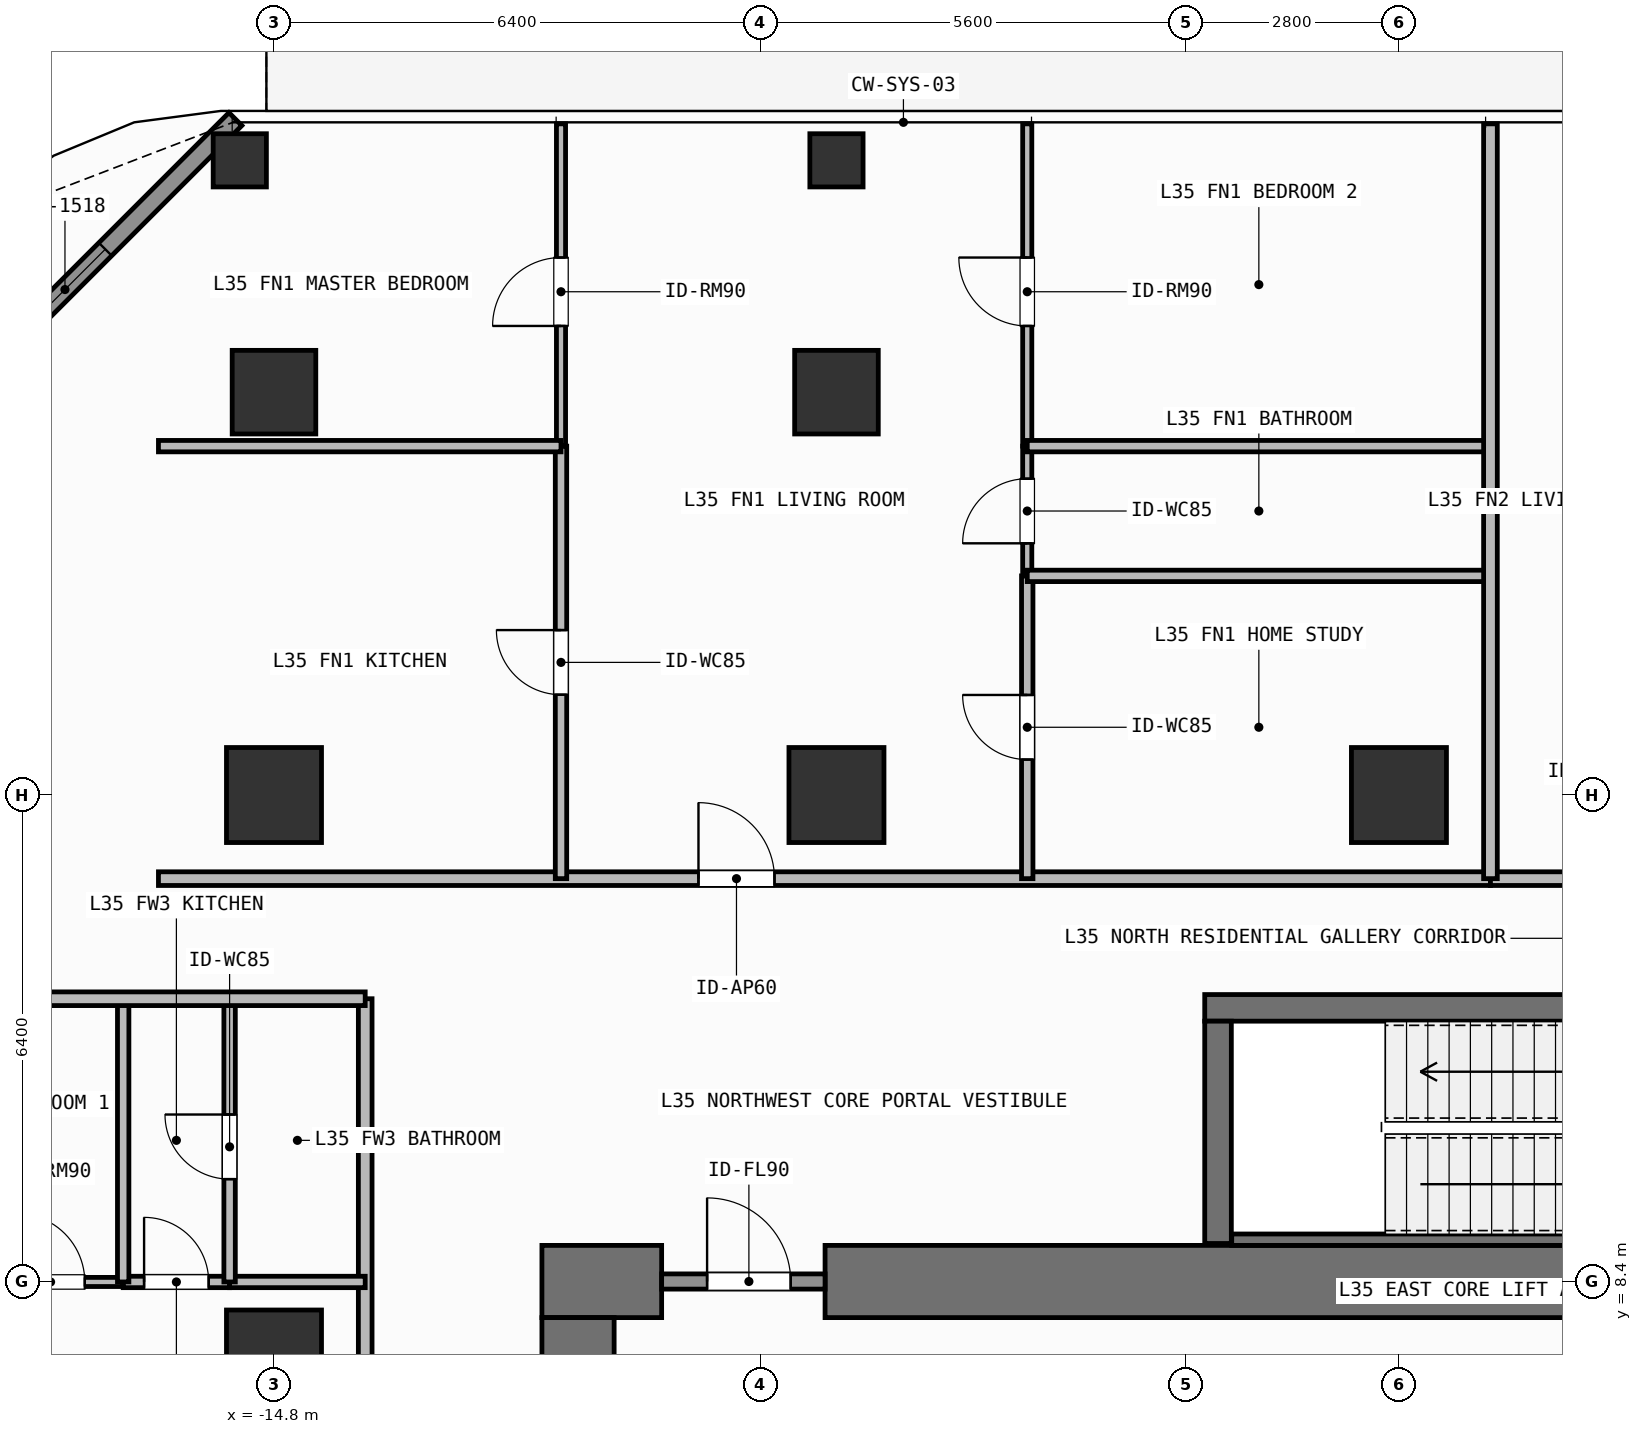
"""IFC4 building model, lengths in metres.
Left out: names, types, materials, properties, quantities, classifications, styles, units other than length and angle.
Written with IfcOpenShell. Run it as: python <this file> out.ifc"""

import sys

from ifc_helpers import new_model, si_unit, direction, frame, frame_2d, origin, origin_2d, place, context, subcontext, project, spatial, rectangle, hollow_rectangle, extrude, element, fill, save


model = new_model("IFC4")
c1 = context("Model", 3, precision=1e-05, world=origin(), true_north=direction((0.0, 1.0)))
c2 = subcontext(c1, "Body", "Model", "MODEL_VIEW")
j1 = project(units=[si_unit("LENGTHUNIT", "METRE"), si_unit("PLANEANGLEUNIT", "RADIAN")], contexts=[c1])
p1 = place(None, origin())
s1 = spatial("IfcSite", under=j1, at=p1, CompositionType="ELEMENT")
p2 = place(p1, origin())
s2 = spatial("IfcBuilding", under=s1, at=p2, CompositionType="ELEMENT")
p3 = place(p2, frame((0.0, 0.0, 140.7)))
s3 = spatial("IfcBuildingStorey", under=s2, at=p3, CompositionType="ELEMENT", Elevation=140.7)
p4 = place(p3, frame((-11.275, 8.4, 0.0), z_axis=(0.0, 0.0, 1.0), x_axis=(1.0, 0.0, 0.0)))
e1 = element("IfcWall", 1, at=p4, inside=s3, PredefinedType="SHEAR", context=c2, shape_type="SweptSolid", body=[
    extrude(rectangle(XDim=1.575, YDim=0.95, at=frame_2d((0.788, 0.0))), origin(), (0.0, 0.0, 1.0), 3.9),
])
p5 = place(p3, frame((-7.55, 8.4, 0.0), z_axis=(0.0, 0.0, 1.0), x_axis=(1.0, 0.0, 0.0)))
e2 = element("IfcWall", 2, at=p5, inside=s3, PredefinedType="SHEAR", context=c2, shape_type="SweptSolid", body=[
    extrude(rectangle(XDim=16.425, YDim=0.95, at=frame_2d((8.212, 0.0))), origin(), (0.0, 0.0, 1.0), 3.9),
])
p6 = place(p3, frame((-10.8, -7.925, 0.0), z_axis=(0.0, 0.0, 1.0), x_axis=(0.0, 1.0, 0.0)))
e3 = element("IfcWall", 3, at=p6, inside=s3, PredefinedType="SHEAR", context=c2, shape_type="SweptSolid", body=[
    extrude(rectangle(XDim=15.85, YDim=0.95, at=frame_2d((7.925, 0.0))), origin(), (0.0, 0.0, 1.0), 3.9),
])
p7 = place(p3, frame((-2.555, 12.0, 0.0), z_axis=(0.0, 0.0, 1.0), x_axis=(1.0, 0.0, 0.0)))
e4 = element("IfcWall", 4, at=p7, inside=s3, PredefinedType="SHEAR", context=c2, shape_type="SweptSolid", body=[
    extrude(rectangle(XDim=7.31, YDim=0.35, at=frame_2d((3.655, 0.0))), origin(), (0.0, 0.0, 1.0), 3.9),
])
p8 = place(p3, frame((-2.2, 8.95, 0.0), z_axis=(0.0, 0.0, 1.0), x_axis=(1.0, 0.0, 0.0)))
e5 = element("IfcWall", 5, at=p8, inside=s3, PredefinedType="SHEAR", context=c2, shape_type="SweptSolid", body=[
    extrude(rectangle(XDim=6.6, YDim=0.15, at=frame_2d((3.3, 0.0))), origin(), (0.0, 0.0, 1.0), 3.9),
])
p9 = place(p3, frame((-2.38, 8.9, 0.0), z_axis=(0.0, 0.0, 1.0), x_axis=(0.0, 1.0, 0.0)))
e6 = element("IfcWall", 6, at=p9, inside=s3, PredefinedType="SHEAR", context=c2, shape_type="SweptSolid", body=[
    extrude(rectangle(XDim=2.925, YDim=0.35, at=frame_2d((1.462, 0.0))), origin(), (0.0, 0.0, 1.0), 3.9),
])
for number, where, z_axis, x_axis in (
    (7, (-14.8, 14.8, 0.0), (0.0, 0.0, 1.0), (1.0, 0.0, 0.0)),
    (8, (-7.4, 14.8, 0.0), (0.0, 0.0, 1.0), (1.0, 0.0, 0.0)),
    (9, (0.0, 14.8, 0.0), (0.0, 0.0, 1.0), (1.0, 0.0, 0.0)),
    (10, (-14.8, 7.4, 0.0), (0.0, 0.0, 1.0), (1.0, 0.0, 0.0)),
):
    element("IfcColumn", number, at=place(p3, frame(where, z_axis=z_axis, x_axis=x_axis)), inside=s3, PredefinedType="COLUMN", context=c2, shape_type="SweptSolid", body=[
        extrude(rectangle(XDim=1.25, YDim=1.25, at=origin_2d()), origin(), (0.0, 0.0, 1.0), 3.9),
    ])
for number, where, z_axis, x_axis in (
    (11, (-14.8, 20.1, 0.0), (0.0, 0.0, 1.0), (1.0, 0.0, 0.0)),
    (12, (-7.4, 20.1, 0.0), (0.0, 0.0, 1.0), (1.0, 0.0, 0.0)),
):
    element("IfcColumn", number, at=place(p3, frame(where, z_axis=z_axis, x_axis=x_axis)), inside=s3, PredefinedType="COLUMN", context=c2, shape_type="SweptSolid", body=[
        extrude(rectangle(XDim=1.1, YDim=1.1, at=origin_2d()), origin(), (0.0, 0.0, 1.0), 3.9),
    ])
for number, where, z_axis, x_axis in (
    (13, (-15.25, 23.15, 0.0), (0.0, 0.0, 1.0), (1.0, 0.0, 0.0)),
    (14, (-7.4, 23.15, 0.0), (0.0, 0.0, 1.0), (1.0, 0.0, 0.0)),
):
    element("IfcColumn", number, at=place(p3, frame(where, z_axis=z_axis, x_axis=x_axis)), inside=s3, PredefinedType="COLUMN", context=c2, shape_type="SweptSolid", body=[
        extrude(hollow_rectangle(XDim=0.7, YDim=0.7, WallThickness=0.032, at=origin_2d()), origin(), (0.0, 0.0, 1.0), 3.9),
    ])
p10 = place(p3, frame((-19.792, 19.208, 0.0), z_axis=(0.0, 0.0, 1.0), x_axis=(0.707106781187, 0.707106781187, 0.0)))
e15 = element("IfcWall", 15, at=p10, inside=s3, PredefinedType="SOLIDWALL", context=c2, shape_type="SweptSolid", body=[
    extrude(rectangle(XDim=6.343, YDim=0.24, at=frame_2d((3.171, 0.0))), origin(), (0.0, 0.0, 1.0), 3.68),
])
p11 = place(p10, frame((2.421, 0.0, 0.8)))
e16 = element("IfcOpeningElement", 16, at=p11, cuts=e15, PredefinedType="OPENING", context=c2, shape_type="SweptSolid", body=[
    extrude(rectangle(XDim=1.5, YDim=1.85, at=frame_2d((0.75, 0.925))), frame((0.0, 0.13, 0.0), z_axis=(0.0, -1.0, 0.0), x_axis=(1.0, 0.0, 0.0)), (0.0, 0.0, 1.0), 0.26),
])
p12 = place(p3, frame((-9.7, 8.4, 0.0), z_axis=(0.0, 0.0, 1.0), x_axis=(1.0, 0.0, 0.0)))
e17 = element("IfcWall", 17, at=p12, inside=s3, PredefinedType="SOLIDWALL", context=c2, shape_type="SweptSolid", body=[
    extrude(rectangle(XDim=2.15, YDim=0.2, at=frame_2d((1.075, 0.0))), origin(), (0.0, 0.0, 1.0), 2.72),
])
p13 = place(p12, frame((0.598, 0.0, 0.0)))
e18 = element("IfcOpeningElement", 18, at=p13, cuts=e17, PredefinedType="OPENING", context=c2, shape_type="SweptSolid", body=[
    extrude(rectangle(XDim=1.1, YDim=2.15, at=frame_2d((0.55, 1.075))), frame((0.0, 0.11, 0.0), z_axis=(0.0, -1.0, 0.0), x_axis=(1.0, 0.0, 0.0)), (0.0, 0.0, 1.0), 0.22),
])
p14 = place(p3, frame((-16.32, 13.7, 0.0), z_axis=(0.0, 0.0, 1.0), x_axis=(1.0, 0.0, 0.0)))
e19 = element("IfcWall", 19, at=p14, inside=s3, PredefinedType="PARTITIONING", context=c2, shape_type="SweptSolid", body=[
    extrude(rectangle(XDim=17.524, YDim=0.18, at=frame_2d((8.762, 0.0))), origin(), (0.0, 0.0, 1.0), 3.68),
])
p15 = place(p14, frame((7.104, 0.0, 0.0)))
e20 = element("IfcOpeningElement", 20, at=p15, cuts=e19, PredefinedType="OPENING", context=c2, shape_type="SweptSolid", body=[
    extrude(rectangle(XDim=1.0, YDim=2.2, at=frame_2d((0.5, 1.1))), frame((0.0, 0.1, 0.0), z_axis=(0.0, -1.0, 0.0), x_axis=(1.0, 0.0, 0.0)), (0.0, 0.0, 1.0), 0.2),
])
p16 = place(p3, frame((-11.024, 13.7, 0.0), z_axis=(0.0, 0.0, 1.0), x_axis=(0.0, 1.0, 0.0)))
e21 = element("IfcWall", 21, at=p16, inside=s3, PredefinedType="PARTITIONING", context=c2, shape_type="SweptSolid", body=[
    extrude(rectangle(XDim=5.69, YDim=0.15, at=frame_2d((2.845, 0.0))), origin(), (0.0, 0.0, 1.0), 3.68),
])
p17 = place(p16, frame((2.42, 0.0, 0.0)))
e22 = element("IfcOpeningElement", 22, at=p17, cuts=e21, PredefinedType="OPENING", context=c2, shape_type="SweptSolid", body=[
    extrude(rectangle(XDim=0.85, YDim=2.1, at=frame_2d((0.425, 1.05))), frame((0.0, 0.085, 0.0), z_axis=(0.0, -1.0, 0.0), x_axis=(1.0, 0.0, 0.0)), (0.0, 0.0, 1.0), 0.17),
])
p18 = place(p3, frame((-11.024, 19.39, 0.0), z_axis=(0.0, 0.0, 1.0), x_axis=(0.0, 1.0, 0.0)))
e23 = element("IfcWall", 23, at=p18, inside=s3, PredefinedType="PARTITIONING", context=c2, shape_type="SweptSolid", body=[
    extrude(rectangle(XDim=4.24, YDim=0.12, at=frame_2d((2.12, 0.0))), origin(), (0.0, 0.0, 1.0), 3.37),
])
p19 = place(p18, frame((1.581, 0.0, 0.0)))
e24 = element("IfcOpeningElement", 24, at=p19, cuts=e23, PredefinedType="OPENING", context=c2, shape_type="SweptSolid", body=[
    extrude(rectangle(XDim=0.9, YDim=2.1, at=frame_2d((0.45, 1.05))), frame((0.0, 0.07, 0.0), z_axis=(0.0, -1.0, 0.0), x_axis=(1.0, 0.0, 0.0)), (0.0, 0.0, 1.0), 0.14),
])
p20 = place(p3, frame((-4.89, 13.7, 0.0), z_axis=(0.0, 0.0, 1.0), x_axis=(0.0, 1.0, 0.0)))
e25 = element("IfcWall", 25, at=p20, inside=s3, PredefinedType="PARTITIONING", context=c2, shape_type="SweptSolid", body=[
    extrude(rectangle(XDim=3.983, YDim=0.15, at=frame_2d((1.992, 0.0))), origin(), (0.0, 0.0, 1.0), 3.68),
])
p21 = place(p20, frame((1.566, 0.0, 0.0)))
e26 = element("IfcOpeningElement", 26, at=p21, cuts=e25, PredefinedType="OPENING", context=c2, shape_type="SweptSolid", body=[
    extrude(rectangle(XDim=0.85, YDim=2.1, at=frame_2d((0.425, 1.05))), frame((0.0, 0.085, 0.0), z_axis=(0.0, -1.0, 0.0), x_axis=(1.0, 0.0, 0.0)), (0.0, 0.0, 1.0), 0.17),
])
p22 = place(p3, frame((-4.89, 17.683, 0.0), z_axis=(0.0, 0.0, 1.0), x_axis=(0.0, 1.0, 0.0)))
e27 = element("IfcWall", 27, at=p22, inside=s3, PredefinedType="PARTITIONING", context=c2, shape_type="SweptSolid", body=[
    extrude(rectangle(XDim=1.707, YDim=0.12, at=frame_2d((0.854, 0.0))), origin(), (0.0, 0.0, 1.0), 3.68),
])
p23 = place(p22, frame((0.428, 0.0, 0.0)))
e28 = element("IfcOpeningElement", 28, at=p23, cuts=e27, PredefinedType="OPENING", context=c2, shape_type="SweptSolid", body=[
    extrude(rectangle(XDim=0.85, YDim=2.1, at=frame_2d((0.425, 1.05))), frame((0.0, 0.07, 0.0), z_axis=(0.0, -1.0, 0.0), x_axis=(1.0, 0.0, 0.0)), (0.0, 0.0, 1.0), 0.14),
])
p24 = place(p3, frame((-4.89, 19.39, 0.0), z_axis=(0.0, 0.0, 1.0), x_axis=(0.0, 1.0, 0.0)))
e29 = element("IfcWall", 29, at=p24, inside=s3, PredefinedType="PARTITIONING", context=c2, shape_type="SweptSolid", body=[
    extrude(rectangle(XDim=4.24, YDim=0.12, at=frame_2d((2.12, 0.0))), origin(), (0.0, 0.0, 1.0), 3.68),
])
p25 = place(p24, frame((1.581, 0.0, 0.0)))
e30 = element("IfcOpeningElement", 30, at=p25, cuts=e29, PredefinedType="OPENING", context=c2, shape_type="SweptSolid", body=[
    extrude(rectangle(XDim=0.9, YDim=2.1, at=frame_2d((0.45, 1.05))), frame((0.0, 0.07, 0.0), z_axis=(0.0, -1.0, 0.0), x_axis=(1.0, 0.0, 0.0)), (0.0, 0.0, 1.0), 0.14),
])
p26 = place(p3, frame((1.204, 13.7, 0.0), z_axis=(0.0, 0.0, 1.0), x_axis=(1.0, 0.0, 0.0)))
e31 = element("IfcWall", 31, at=p26, inside=s3, PredefinedType="PARTITIONING", context=c2, shape_type="SweptSolid", body=[
    extrude(rectangle(XDim=7.616, YDim=0.18, at=frame_2d((3.808, 0.0))), origin(), (0.0, 0.0, 1.0), 3.68),
])
p27 = place(p26, frame((1.599, 0.0, 0.0)))
e32 = element("IfcOpeningElement", 32, at=p27, cuts=e31, PredefinedType="OPENING", context=c2, shape_type="SweptSolid", body=[
    extrude(rectangle(XDim=1.0, YDim=2.2, at=frame_2d((0.5, 1.1))), frame((0.0, 0.1, 0.0), z_axis=(0.0, -1.0, 0.0), x_axis=(1.0, 0.0, 0.0)), (0.0, 0.0, 1.0), 0.2),
])
p28 = place(p3, frame((-13.6, 4.04, 0.0), z_axis=(0.0, 0.0, 1.0), x_axis=(0.0, 1.0, 0.0)))
e33 = element("IfcWall", 33, at=p28, inside=s3, PredefinedType="PARTITIONING", context=c2, shape_type="SweptSolid", body=[
    extrude(rectangle(XDim=8.08, YDim=0.18, at=frame_2d((4.04, 0.0))), origin(), (0.0, 0.0, 1.0), 3.68),
])
p29 = place(p28, frame((1.583, 0.0, 0.0)))
e34 = element("IfcOpeningElement", 34, at=p29, cuts=e33, PredefinedType="OPENING", context=c2, shape_type="SweptSolid", body=[
    extrude(rectangle(XDim=1.0, YDim=2.2, at=frame_2d((0.5, 1.1))), frame((0.0, 0.1, 0.0), z_axis=(0.0, -1.0, 0.0), x_axis=(1.0, 0.0, 0.0)), (0.0, 0.0, 1.0), 0.2),
])
p30 = place(p3, frame((-16.784, 8.394, 0.0), z_axis=(0.0, 0.0, 1.0), x_axis=(1.0, 0.0, 0.0)))
e35 = element("IfcWall", 35, at=p30, inside=s3, PredefinedType="PARTITIONING", context=c2, shape_type="SweptSolid", body=[
    extrude(rectangle(XDim=1.4, YDim=0.15, at=frame_2d((0.7, 0.0))), origin(), (0.0, 0.0, 1.0), 3.68),
])
p31 = place(p30, frame((0.275, 0.0, 0.0)))
e36 = element("IfcOpeningElement", 36, at=p31, cuts=e35, PredefinedType="OPENING", context=c2, shape_type="SweptSolid", body=[
    extrude(rectangle(XDim=0.85, YDim=2.1, at=frame_2d((0.425, 1.05))), frame((0.0, 0.085, 0.0), z_axis=(0.0, -1.0, 0.0), x_axis=(1.0, 0.0, 0.0)), (0.0, 0.0, 1.0), 0.17),
])
p32 = place(p3, frame((-15.384, 8.394, 0.0), z_axis=(0.0, 0.0, 1.0), x_axis=(1.0, 0.0, 0.0)))
e37 = element("IfcWall", 37, at=p32, inside=s3, PredefinedType="PARTITIONING", context=c2, shape_type="SweptSolid", body=[
    extrude(rectangle(XDim=1.784, YDim=0.15, at=frame_2d((0.892, 0.0))), origin(), (0.0, 0.0, 1.0), 3.68),
])
p33 = place(p3, frame((-19.73, 8.394, 0.0), z_axis=(0.0, 0.0, 1.0), x_axis=(1.0, 0.0, 0.0)))
e38 = element("IfcWall", 38, at=p33, inside=s3, PredefinedType="PARTITIONING", context=c2, shape_type="SweptSolid", body=[
    extrude(rectangle(XDim=2.946, YDim=0.12, at=frame_2d((1.473, 0.0))), origin(), (0.0, 0.0, 1.0), 3.68),
])
p34 = place(p33, frame((1.541, 0.0, 0.0)))
e39 = element("IfcOpeningElement", 39, at=p34, cuts=e38, PredefinedType="OPENING", context=c2, shape_type="SweptSolid", body=[
    extrude(rectangle(XDim=0.9, YDim=2.1, at=frame_2d((0.45, 1.05))), frame((0.0, 0.07, 0.0), z_axis=(0.0, -1.0, 0.0), x_axis=(1.0, 0.0, 0.0)), (0.0, 0.0, 1.0), 0.14),
])
p35 = place(p3, frame((-16.32, 19.39, 0.0), z_axis=(0.0, 0.0, 1.0), x_axis=(1.0, 0.0, 0.0)))
e40 = element("IfcWall", 40, at=p35, inside=s3, PredefinedType="PARTITIONING", context=c2, shape_type="SweptSolid", body=[
    extrude(rectangle(XDim=5.296, YDim=0.15, at=frame_2d((2.648, 0.0))), origin(), (0.0, 0.0, 1.0), 3.68),
])
for number, where, z_axis, x_axis in (
    (41, (-4.89, 17.683, 0.0), (0.0, 0.0, 1.0), (1.0, 0.0, 0.0)),
    (42, (-4.89, 19.39, 0.0), (0.0, 0.0, 1.0), (1.0, 0.0, 0.0)),
):
    element("IfcWall", number, at=place(p3, frame(where, z_axis=z_axis, x_axis=x_axis)), inside=s3, PredefinedType="PARTITIONING", context=c2, shape_type="SweptSolid", body=[
        extrude(rectangle(XDim=6.094, YDim=0.15, at=frame_2d((3.047, 0.0))), origin(), (0.0, 0.0, 1.0), 3.68),
    ])
p36 = place(p3, frame((1.204, 13.7, 0.0), z_axis=(0.0, 0.0, 1.0), x_axis=(0.0, 1.0, 0.0)))
e43 = element("IfcWall", 43, at=p36, inside=s3, PredefinedType="PARTITIONING", context=c2, shape_type="SweptSolid", body=[
    extrude(rectangle(XDim=9.93, YDim=0.18, at=frame_2d((4.965, 0.0))), origin(), (0.0, 0.0, 1.0), 3.68),
])
p37 = place(p3, frame((-15.384, 8.394, 0.0), z_axis=(0.0, 0.0, 1.0), x_axis=(0.0, 1.0, 0.0)))
e44 = element("IfcWall", 44, at=p37, inside=s3, PredefinedType="PARTITIONING", context=c2, shape_type="SweptSolid", body=[
    extrude(rectangle(XDim=3.726, YDim=0.15, at=frame_2d((1.863, 0.0))), origin(), (0.0, 0.0, 1.0), 3.68),
])
p38 = place(p37, frame((1.353, 0.0, 0.0)))
e45 = element("IfcOpeningElement", 45, at=p38, cuts=e44, PredefinedType="OPENING", context=c2, shape_type="SweptSolid", body=[
    extrude(rectangle(XDim=0.85, YDim=2.1, at=frame_2d((0.425, 1.05))), frame((0.0, 0.085, 0.0), z_axis=(0.0, -1.0, 0.0), x_axis=(1.0, 0.0, 0.0)), (0.0, 0.0, 1.0), 0.17),
])
p39 = place(p3, frame((-16.784, 8.394, 0.0), z_axis=(0.0, 0.0, 1.0), x_axis=(0.0, 1.0, 0.0)))
e46 = element("IfcWall", 46, at=p39, inside=s3, PredefinedType="PARTITIONING", context=c2, shape_type="SweptSolid", body=[
    extrude(rectangle(XDim=3.726, YDim=0.15, at=frame_2d((1.863, 0.0))), origin(), (0.0, 0.0, 1.0), 3.68),
])
p40 = place(p3, frame((-19.73, 12.12, 0.0), z_axis=(0.0, 0.0, 1.0), x_axis=(1.0, 0.0, 0.0)))
e47 = element("IfcWall", 47, at=p40, inside=s3, PredefinedType="PARTITIONING", context=c2, shape_type="SweptSolid", body=[
    extrude(rectangle(XDim=6.13, YDim=0.18, at=frame_2d((3.065, 0.0))), origin(), (0.0, 0.0, 1.0), 3.68),
])
p41 = place(p11, origin())
e48 = element("IfcWindow", 48, at=p41, inside=s3, PartitioningType="SINGLE_PANEL", PredefinedType="WINDOW", context=c2, shape_type="SweptSolid", body=[
    extrude(rectangle(XDim=1.5, YDim=1.85, at=frame_2d((0.75, 0.925))), frame((0.0, 0.03, 0.0), z_axis=(0.0, -1.0, 0.0), x_axis=(1.0, 0.0, 0.0)), (0.0, 0.0, 1.0), 0.06),
])
fill(e16, e48)
p42 = place(p13, origin())
e49 = element("IfcDoor", 49, at=p42, inside=s3, OperationType="SINGLE_SWING_LEFT", PredefinedType="DOOR", context=c2, shape_type="SweptSolid", body=[
    extrude(rectangle(XDim=1.1, YDim=2.15, at=frame_2d((0.55, 1.075))), frame((0.0, 0.025, 0.0), z_axis=(0.0, -1.0, 0.0), x_axis=(1.0, 0.0, 0.0)), (0.0, 0.0, 1.0), 0.05),
])
fill(e18, e49)
p43 = place(p15, origin())
e50 = element("IfcDoor", 50, at=p43, inside=s3, OperationType="SINGLE_SWING_LEFT", PredefinedType="DOOR", context=c2, shape_type="SweptSolid", body=[
    extrude(rectangle(XDim=1.0, YDim=2.2, at=frame_2d((0.5, 1.1))), frame((0.0, 0.025, 0.0), z_axis=(0.0, -1.0, 0.0), x_axis=(1.0, 0.0, 0.0)), (0.0, 0.0, 1.0), 0.05),
])
fill(e20, e50)
p44 = place(p17, origin())
e51 = element("IfcDoor", 51, at=p44, inside=s3, OperationType="SINGLE_SWING_RIGHT", PredefinedType="DOOR", context=c2, shape_type="SweptSolid", body=[
    extrude(rectangle(XDim=0.85, YDim=2.1, at=frame_2d((0.425, 1.05))), frame((0.0, 0.025, 0.0), z_axis=(0.0, -1.0, 0.0), x_axis=(1.0, 0.0, 0.0)), (0.0, 0.0, 1.0), 0.05),
])
fill(e22, e51)
p45 = place(p19, origin())
e52 = element("IfcDoor", 52, at=p45, inside=s3, OperationType="SINGLE_SWING_LEFT", PredefinedType="DOOR", context=c2, shape_type="SweptSolid", body=[
    extrude(rectangle(XDim=0.9, YDim=2.1, at=frame_2d((0.45, 1.05))), frame((0.0, 0.025, 0.0), z_axis=(0.0, -1.0, 0.0), x_axis=(1.0, 0.0, 0.0)), (0.0, 0.0, 1.0), 0.05),
])
fill(e24, e52)
p46 = place(p21, origin())
e53 = element("IfcDoor", 53, at=p46, inside=s3, OperationType="SINGLE_SWING_RIGHT", PredefinedType="DOOR", context=c2, shape_type="SweptSolid", body=[
    extrude(rectangle(XDim=0.85, YDim=2.1, at=frame_2d((0.425, 1.05))), frame((0.0, 0.025, 0.0), z_axis=(0.0, -1.0, 0.0), x_axis=(1.0, 0.0, 0.0)), (0.0, 0.0, 1.0), 0.05),
])
fill(e26, e53)
p47 = place(p23, origin())
e54 = element("IfcDoor", 54, at=p47, inside=s3, OperationType="SINGLE_SWING_LEFT", PredefinedType="DOOR", context=c2, shape_type="SweptSolid", body=[
    extrude(rectangle(XDim=0.85, YDim=2.1, at=frame_2d((0.425, 1.05))), frame((0.0, 0.025, 0.0), z_axis=(0.0, -1.0, 0.0), x_axis=(1.0, 0.0, 0.0)), (0.0, 0.0, 1.0), 0.05),
])
fill(e28, e54)
p48 = place(p25, origin())
e55 = element("IfcDoor", 55, at=p48, inside=s3, OperationType="SINGLE_SWING_RIGHT", PredefinedType="DOOR", context=c2, shape_type="SweptSolid", body=[
    extrude(rectangle(XDim=0.9, YDim=2.1, at=frame_2d((0.45, 1.05))), frame((0.0, 0.025, 0.0), z_axis=(0.0, -1.0, 0.0), x_axis=(1.0, 0.0, 0.0)), (0.0, 0.0, 1.0), 0.05),
])
fill(e30, e55)
p49 = place(p31, origin())
e56 = element("IfcDoor", 56, at=p49, inside=s3, OperationType="SINGLE_SWING_LEFT", PredefinedType="DOOR", context=c2, shape_type="SweptSolid", body=[
    extrude(rectangle(XDim=0.85, YDim=2.1, at=frame_2d((0.425, 1.05))), frame((0.0, 0.025, 0.0), z_axis=(0.0, -1.0, 0.0), x_axis=(1.0, 0.0, 0.0)), (0.0, 0.0, 1.0), 0.05),
])
fill(e36, e56)
p50 = place(p38, origin())
e57 = element("IfcDoor", 57, at=p50, inside=s3, OperationType="SINGLE_SWING_RIGHT", PredefinedType="DOOR", context=c2, shape_type="SweptSolid", body=[
    extrude(rectangle(XDim=0.85, YDim=2.1, at=frame_2d((0.425, 1.05))), frame((0.0, 0.025, 0.0), z_axis=(0.0, -1.0, 0.0), x_axis=(1.0, 0.0, 0.0)), (0.0, 0.0, 1.0), 0.05),
])
fill(e45, e57)
p51 = place(p34, origin())
e58 = element("IfcDoor", 58, at=p51, inside=s3, OperationType="SINGLE_SWING_LEFT", PredefinedType="DOOR", context=c2, shape_type="SweptSolid", body=[
    extrude(rectangle(XDim=0.9, YDim=2.1, at=frame_2d((0.45, 1.05))), frame((0.0, 0.025, 0.0), z_axis=(0.0, -1.0, 0.0), x_axis=(1.0, 0.0, 0.0)), (0.0, 0.0, 1.0), 0.05),
])
fill(e39, e58)
save(model, sys.argv[1])
